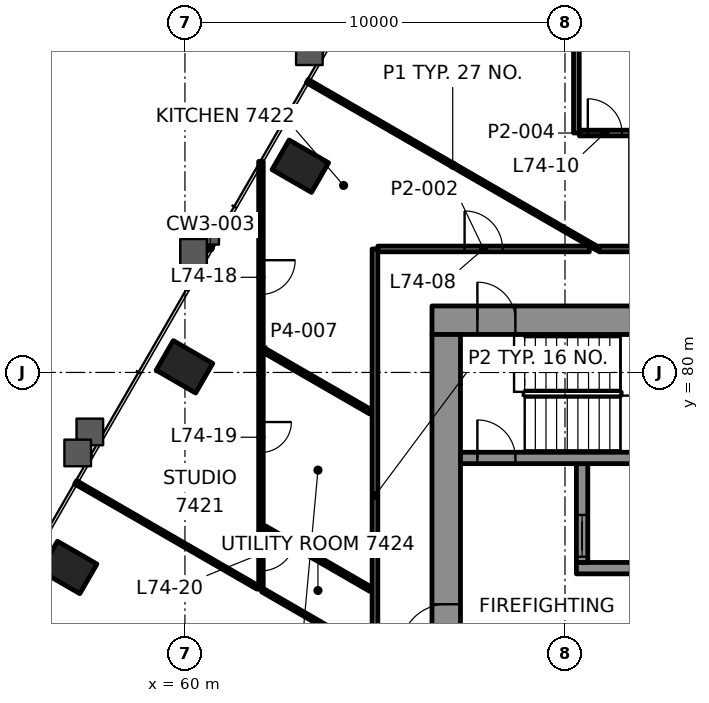
"""IFC4 building model, lengths in metres.
Left out: names, types, materials, properties, quantities, classifications, styles, units other than length and angle.
Written with IfcOpenShell. Run it as: python <this file> out.ifc"""

import sys

from ifc_helpers import new_model, si_unit, direction, frame, frame_2d, origin, origin_2d, place, context, subcontext, project, spatial, rectangle, hollow_rectangle, extrude, element, fill, save


model = new_model("IFC4")
c1 = context("Model", 3, precision=1e-05, world=origin(), true_north=direction((0.0, 1.0)))
c2 = subcontext(c1, "Body", "Model", "MODEL_VIEW")
j1 = project(units=[si_unit("LENGTHUNIT", "METRE"), si_unit("PLANEANGLEUNIT", "RADIAN")], contexts=[c1])
p1 = place(None, origin())
s1 = spatial("IfcSite", under=j1, at=p1, CompositionType="ELEMENT")
p2 = place(p1, origin())
s2 = spatial("IfcBuilding", under=s1, at=p2, CompositionType="ELEMENT")
p3 = place(p2, frame((0.0, 0.0, 305.6)))
s3 = spatial("IfcBuildingStorey", under=s2, at=p3, CompositionType="ELEMENT", Elevation=305.6)
for number, where, z_axis, x_axis in (
    (1, (63.035, 85.427, -0.0), (0.0, 0.0, 1.0), (-0.5, -0.866, 0.0)),
    (2, (59.987, 80.148, -0.0), (0.0, 0.0, 1.0), (-0.5, -0.866, 0.0)),
    (3, (56.939, 74.869, -0.0), (0.0, 0.0, 1.0), (-0.5, -0.866, 0.0)),
):
    element("IfcColumn", number, at=place(p3, frame(where, z_axis=z_axis, x_axis=x_axis)), inside=s3, PredefinedType="COLUMN", context=c2, shape_type="SweptSolid", body=[
        extrude(hollow_rectangle(XDim=0.9, YDim=1.2, WallThickness=0.06, at=origin_2d()), origin(), (0.0, 0.0, 1.0), 3.5),
    ])
p4 = place(p3, frame((66.5, 81.375, 0.0), z_axis=(0.0, 0.0, 1.0), x_axis=(1.0, 0.0, 0.0)))
e4 = element("IfcWall", 4, at=p4, inside=s3, PredefinedType="SHEAR", context=c2, shape_type="SweptSolid", body=[
    extrude(rectangle(XDim=17.0, YDim=0.75, at=frame_2d((8.5, 0.0))), origin(), (0.0, 0.0, 1.0), 3.3),
])
p5 = place(p4, frame((1.195, 0.0, 0.0)))
e5 = element("IfcOpeningElement", 5, at=p5, cuts=e4, PredefinedType="OPENING", context=c2, shape_type="SweptSolid", body=[
    extrude(rectangle(XDim=1.0, YDim=2.1, at=frame_2d((0.5, 1.05))), frame((0.0, 0.385, 0.0), z_axis=(0.0, -1.0, 0.0), x_axis=(1.0, 0.0, 0.0)), (0.0, 0.0, 1.0), 0.77),
])
p6 = place(p4, frame((15.005, 0.0, 0.0)))
e6 = element("IfcOpeningElement", 6, at=p6, cuts=e4, PredefinedType="OPENING", context=c2, shape_type="SweptSolid", body=[
    extrude(rectangle(XDim=1.0, YDim=2.1, at=frame_2d((0.5, 1.05))), frame((0.0, 0.385, 0.0), z_axis=(0.0, -1.0, 0.0), x_axis=(1.0, 0.0, 0.0)), (0.0, 0.0, 1.0), 0.77),
])
p7 = place(p4, frame((8.15, 0.0, 0.0)))
e7 = element("IfcOpeningElement", 7, at=p7, cuts=e4, PredefinedType="OPENING", context=c2, shape_type="SweptSolid", body=[
    extrude(rectangle(XDim=0.9, YDim=2.1, at=frame_2d((0.45, 1.05))), frame((0.0, 0.385, 0.0), z_axis=(0.0, -1.0, 0.0), x_axis=(1.0, 0.0, 0.0)), (0.0, 0.0, 1.0), 0.77),
])
p8 = place(p3, frame((66.875, 69.0, 0.0), z_axis=(0.0, 0.0, 1.0), x_axis=(0.0, 1.0, 0.0)))
e8 = element("IfcWall", 8, at=p8, inside=s3, PredefinedType="SHEAR", context=c2, shape_type="SweptSolid", body=[
    extrude(rectangle(XDim=12.0, YDim=0.75, at=frame_2d((6.0, 0.0))), origin(), (0.0, 0.0, 1.0), 3.3),
])
p9 = place(p8, frame((3.7, 0.0, 0.0)))
e9 = element("IfcOpeningElement", 9, at=p9, cuts=e8, PredefinedType="OPENING", context=c2, shape_type="SweptSolid", body=[
    extrude(rectangle(XDim=1.2, YDim=2.1, at=frame_2d((0.6, 1.05))), frame((0.0, 0.385, 0.0), z_axis=(0.0, -1.0, 0.0), x_axis=(1.0, 0.0, 0.0)), (0.0, 0.0, 1.0), 0.77),
])
p10 = place(p8, frame((0.925, 0.0, 0.0)))
e10 = element("IfcOpeningElement", 10, at=p10, cuts=e8, PredefinedType="OPENING", context=c2, shape_type="SweptSolid", body=[
    extrude(rectangle(XDim=0.9, YDim=2.1, at=frame_2d((0.45, 1.05))), frame((0.0, 0.385, 0.0), z_axis=(0.0, -1.0, 0.0), x_axis=(1.0, 0.0, 0.0)), (0.0, 0.0, 1.0), 0.77),
])
p11 = place(p3, frame((70.3, 74.85, 0.0), z_axis=(0.0, 0.0, 1.0), x_axis=(1.0, 0.0, 0.0)))
e11 = element("IfcWall", 11, at=p11, inside=s3, PredefinedType="SHEAR", context=c2, shape_type="SweptSolid", body=[
    extrude(rectangle(XDim=5.9, YDim=0.3, at=frame_2d((2.95, 0.0))), origin(), (0.0, 0.0, 1.0), 3.3),
])
p12 = place(p11, frame((3.8, 0.0, 0.0)))
e12 = element("IfcOpeningElement", 12, at=p12, cuts=e11, PredefinedType="OPENING", context=c2, shape_type="SweptSolid", body=[
    extrude(rectangle(XDim=1.1, YDim=2.1, at=frame_2d((0.55, 1.05))), frame((0.0, 0.16, 0.0), z_axis=(0.0, -1.0, 0.0), x_axis=(1.0, 0.0, 0.0)), (0.0, 0.0, 1.0), 0.32),
])
p13 = place(p3, frame((70.45, 75.0, 0.0), z_axis=(0.0, 0.0, 1.0), x_axis=(0.0, 1.0, 0.0)))
e13 = element("IfcWall", 13, at=p13, inside=s3, PredefinedType="SHEAR", context=c2, shape_type="SweptSolid", body=[
    extrude(rectangle(XDim=2.6, YDim=0.3, at=frame_2d((1.3, 0.0))), origin(), (0.0, 0.0, 1.0), 3.3),
])
p14 = place(p13, frame((0.15, 0.0, 0.0)))
e14 = element("IfcOpeningElement", 14, at=p14, cuts=e13, PredefinedType="OPENING", context=c2, shape_type="SweptSolid", body=[
    extrude(rectangle(XDim=1.1, YDim=2.1, at=frame_2d((0.55, 1.05))), frame((0.0, 0.16, 0.0), z_axis=(0.0, -1.0, 0.0), x_axis=(1.0, 0.0, 0.0)), (0.0, 0.0, 1.0), 0.32),
])
p15 = place(p3, frame((67.25, 77.75, 0.0), z_axis=(0.0, 0.0, 1.0), x_axis=(1.0, 0.0, 0.0)))
e15 = element("IfcWall", 15, at=p15, inside=s3, PredefinedType="SHEAR", context=c2, shape_type="SweptSolid", body=[
    extrude(rectangle(XDim=15.5, YDim=0.3, at=frame_2d((7.75, 0.0))), origin(), (0.0, 0.0, 1.0), 3.3),
])
p16 = place(p15, frame((0.445, 0.0, 0.0)))
e16 = element("IfcOpeningElement", 16, at=p16, cuts=e15, PredefinedType="OPENING", context=c2, shape_type="SweptSolid", body=[
    extrude(rectangle(XDim=1.0, YDim=2.1, at=frame_2d((0.5, 1.05))), frame((0.0, 0.16, 0.0), z_axis=(0.0, -1.0, 0.0), x_axis=(1.0, 0.0, 0.0)), (0.0, 0.0, 1.0), 0.32),
])
p17 = place(p3, frame((65.075, 83.25, 0.0), z_axis=(0.0, 0.0, 1.0), x_axis=(1.0, 0.0, 0.0)))
e17 = element("IfcWall", 17, at=p17, inside=s3, PredefinedType="PARTITIONING", context=c2, shape_type="SweptSolid", body=[
    extrude(rectangle(XDim=5.565, YDim=0.15, at=frame_2d((2.783, 0.0))), origin(), (0.0, 0.0, 1.0), 2.7),
])
p18 = place(p17, frame((2.283, 0.0, 0.0)))
e18 = element("IfcOpeningElement", 18, at=p18, cuts=e17, PredefinedType="OPENING", context=c2, shape_type="SweptSolid", body=[
    extrude(rectangle(XDim=1.0, YDim=2.1, at=frame_2d((0.5, 1.05))), frame((0.0, 0.085, 0.0), z_axis=(0.0, -1.0, 0.0), x_axis=(1.0, 0.0, 0.0)), (0.0, 0.0, 1.0), 0.17),
])
p19 = place(p3, frame((70.377, 86.3, 0.0), z_axis=(0.0, 0.0, 1.0), x_axis=(1.0, 0.0, 0.0)))
e19 = element("IfcWall", 19, at=p19, inside=s3, PredefinedType="PARTITIONING", context=c2, shape_type="SweptSolid", body=[
    extrude(rectangle(XDim=1.348, YDim=0.15, at=frame_2d((0.674, 0.0))), origin(), (0.0, 0.0, 1.0), 2.7),
])
p20 = place(p19, frame((0.224, 0.0, 0.0)))
e20 = element("IfcOpeningElement", 20, at=p20, cuts=e19, PredefinedType="OPENING", context=c2, shape_type="SweptSolid", body=[
    extrude(rectangle(XDim=0.9, YDim=2.1, at=frame_2d((0.45, 1.05))), frame((0.0, 0.085, 0.0), z_axis=(0.0, -1.0, 0.0), x_axis=(1.0, 0.0, 0.0)), (0.0, 0.0, 1.0), 0.17),
])
p21 = place(p3, frame((70.3, 86.302, 0.0), z_axis=(0.0, 0.0, 1.0), x_axis=(0.0, 1.0, 0.0)))
e21 = element("IfcWall", 21, at=p21, inside=s3, PredefinedType="PARTITIONING", context=c2, shape_type="SweptSolid", body=[
    extrude(rectangle(XDim=9.796, YDim=0.15, at=frame_2d((4.898, 0.0))), origin(), (0.0, 0.0, 1.0), 2.7),
])
p22 = place(p3, frame((65.0, 70.266, 0.0), z_axis=(0.0, 0.0, 1.0), x_axis=(0.0, 1.0, 0.0)))
e22 = element("IfcWall", 22, at=p22, inside=s3, PredefinedType="PARTITIONING", context=c2, shape_type="SweptSolid", body=[
    extrude(rectangle(XDim=12.984, YDim=0.15, at=frame_2d((6.492, 0.0))), origin(), (0.0, 0.0, 1.0), 2.7),
])
p23 = place(p3, frame((62.0, 85.554, 0.0), z_axis=(0.0, 0.0, 1.0), x_axis=(0.0, -1.0, 0.0)))
e23 = element("IfcWall", 23, at=p23, inside=s3, PredefinedType="PARTITIONING", context=c2, shape_type="SweptSolid", body=[
    extrude(rectangle(XDim=11.261, YDim=0.12, at=frame_2d((5.63, 0.0))), origin(), (0.0, 0.0, 1.0), 2.688),
])
p24 = place(p23, frame((2.6, 0.0, 0.0)))
e24 = element("IfcOpeningElement", 24, at=p24, cuts=e23, PredefinedType="OPENING", context=c2, shape_type="SweptSolid", body=[
    extrude(rectangle(XDim=0.9, YDim=2.1, at=frame_2d((0.45, 1.05))), frame((0.0, 0.07, 0.0), z_axis=(0.0, -1.0, 0.0), x_axis=(1.0, 0.0, 0.0)), (0.0, 0.0, 1.0), 0.14),
])
p25 = place(p23, frame((6.859, 0.0, 0.0)))
e25 = element("IfcOpeningElement", 25, at=p25, cuts=e23, PredefinedType="OPENING", context=c2, shape_type="SweptSolid", body=[
    extrude(rectangle(XDim=0.8, YDim=2.1, at=frame_2d((0.4, 1.05))), frame((0.0, 0.07, 0.0), z_axis=(0.0, -1.0, 0.0), x_axis=(1.0, 0.0, 0.0)), (0.0, 0.0, 1.0), 0.14),
])
p26 = place(p23, frame((9.876, 0.0, 0.0)))
e26 = element("IfcOpeningElement", 26, at=p26, cuts=e23, PredefinedType="OPENING", context=c2, shape_type="SweptSolid", body=[
    extrude(rectangle(XDim=0.9, YDim=2.1, at=frame_2d((0.45, 1.05))), frame((0.0, 0.07, 0.0), z_axis=(0.0, -1.0, 0.0), x_axis=(1.0, 0.0, 0.0)), (0.0, 0.0, 1.0), 0.14),
])
p27 = place(p3, frame((70.871, 83.25, 0.0), z_axis=(0.0, 0.0, 1.0), x_axis=(-0.866018527528, 0.500011909837, 0.0)))
e27 = element("IfcWall", 27, at=p27, inside=s3, PredefinedType="PARTITIONING", context=c2, shape_type="SweptSolid", body=[
    extrude(rectangle(XDim=8.834, YDim=0.1, at=frame_2d((4.417, 0.0))), origin(), (0.0, 0.0, 1.0), 2.688),
])
for number, where, z_axis, x_axis in (
    (28, (64.89, 78.959, 0.0), (0.0, 0.0, 1.0), (-0.866, 0.5, 0.0)),
    (29, (64.89, 74.293, 0.0), (0.0, 0.0, 1.0), (-0.866, 0.5, 0.0)),
):
    element("IfcWall", number, at=place(p3, frame(where, z_axis=z_axis, x_axis=x_axis)), inside=s3, PredefinedType="PARTITIONING", context=c2, shape_type="SweptSolid", body=[
        extrude(rectangle(XDim=3.228, YDim=0.12, at=frame_2d((1.614, 0.0))), origin(), (0.0, 0.0, 1.0), 2.7),
    ])
p28 = place(p3, frame((64.899, 72.62, 0.0), z_axis=(0.0, 0.0, 1.0), x_axis=(-0.866032610133, 0.499987518031, 0.0)))
e30 = element("IfcWall", 30, at=p28, inside=s3, PredefinedType="PARTITIONING", context=c2, shape_type="SweptSolid", body=[
    extrude(rectangle(XDim=3.295, YDim=0.1, at=frame_2d((1.648, 0.0))), origin(), (0.0, 0.0, 1.0), 2.7),
])
p29 = place(p3, frame((70.896, 83.25, 0.0), z_axis=(0.0, 0.0, 1.0), x_axis=(1.0, 0.0, 0.0)))
e31 = element("IfcWall", 31, at=p29, inside=s3, PredefinedType="PARTITIONING", context=c2, shape_type="SweptSolid", body=[
    extrude(rectangle(XDim=0.905, YDim=0.15, at=frame_2d((0.452, 0.0))), origin(), (0.0, 0.0, 1.0), 2.7),
])
p30 = place(p3, frame((61.915, 74.343, 0.0), z_axis=(0.0, 0.0, 1.0), x_axis=(-0.866023907196, 0.500002592159, 0.0)))
e32 = element("IfcWall", 32, at=p30, inside=s3, PredefinedType="PARTITIONING", context=c2, shape_type="SweptSolid", body=[
    extrude(rectangle(XDim=5.532, YDim=0.1, at=frame_2d((2.766, 0.0))), origin(), (0.0, 0.0, 1.0), 2.688),
])
p31 = place(p18, origin())
e33 = element("IfcDoor", 33, at=p31, inside=s3, OperationType="SINGLE_SWING_RIGHT", PredefinedType="DOOR", context=c2, shape_type="SweptSolid", body=[
    extrude(rectangle(XDim=1.0, YDim=2.1, at=frame_2d((0.5, 1.05))), frame((0.0, 0.025, 0.0), z_axis=(0.0, -1.0, 0.0), x_axis=(1.0, 0.0, 0.0)), (0.0, 0.0, 1.0), 0.05),
])
fill(e18, e33)
p32 = place(p20, origin())
e34 = element("IfcDoor", 34, at=p32, inside=s3, OperationType="SINGLE_SWING_LEFT", PredefinedType="DOOR", context=c2, shape_type="SweptSolid", body=[
    extrude(rectangle(XDim=0.9, YDim=2.1, at=frame_2d((0.45, 1.05))), frame((0.0, 0.025, 0.0), z_axis=(0.0, -1.0, 0.0), x_axis=(1.0, 0.0, 0.0)), (0.0, 0.0, 1.0), 0.05),
])
fill(e20, e34)
p33 = place(p24, origin())
e35 = element("IfcDoor", 35, at=p33, inside=s3, OperationType="SINGLE_SWING_RIGHT", PredefinedType="DOOR", context=c2, shape_type="SweptSolid", body=[
    extrude(rectangle(XDim=0.9, YDim=2.1, at=frame_2d((0.45, 1.05))), frame((0.0, 0.025, 0.0), z_axis=(0.0, -1.0, 0.0), x_axis=(1.0, 0.0, 0.0)), (0.0, 0.0, 1.0), 0.05),
])
fill(e24, e35)
p34 = place(p25, origin())
e36 = element("IfcDoor", 36, at=p34, inside=s3, OperationType="SINGLE_SWING_RIGHT", PredefinedType="DOOR", context=c2, shape_type="SweptSolid", body=[
    extrude(rectangle(XDim=0.8, YDim=2.1, at=frame_2d((0.4, 1.05))), frame((0.0, 0.025, 0.0), z_axis=(0.0, -1.0, 0.0), x_axis=(1.0, 0.0, 0.0)), (0.0, 0.0, 1.0), 0.05),
])
fill(e25, e36)
p35 = place(p26, origin())
e37 = element("IfcDoor", 37, at=p35, inside=s3, OperationType="SINGLE_SWING_LEFT", PredefinedType="DOOR", context=c2, shape_type="SweptSolid", body=[
    extrude(rectangle(XDim=0.9, YDim=2.1, at=frame_2d((0.45, 1.05))), frame((0.0, 0.025, 0.0), z_axis=(0.0, -1.0, 0.0), x_axis=(1.0, 0.0, 0.0)), (0.0, 0.0, 1.0), 0.05),
])
fill(e26, e37)
p36 = place(p14, origin())
e38 = element("IfcDoor", 38, at=p36, inside=s3, OperationType="DOUBLE_DOOR_SLIDING", PredefinedType="DOOR", context=c2, shape_type="SweptSolid", body=[
    extrude(rectangle(XDim=1.1, YDim=2.1, at=frame_2d((0.55, 1.05))), frame((0.0, 0.025, 0.0), z_axis=(0.0, -1.0, 0.0), x_axis=(1.0, 0.0, 0.0)), (0.0, 0.0, 1.0), 0.05),
])
fill(e14, e38)
p37 = place(p16, origin())
e39 = element("IfcDoor", 39, at=p37, inside=s3, OperationType="SINGLE_SWING_LEFT", PredefinedType="DOOR", context=c2, shape_type="SweptSolid", body=[
    extrude(rectangle(XDim=1.0, YDim=2.1, at=frame_2d((0.5, 1.05))), frame((0.0, 0.025, 0.0), z_axis=(0.0, -1.0, 0.0), x_axis=(1.0, 0.0, 0.0)), (0.0, 0.0, 1.0), 0.05),
])
fill(e16, e39)
p38 = place(p5, origin())
e40 = element("IfcDoor", 40, at=p38, inside=s3, OperationType="SINGLE_SWING_RIGHT", PredefinedType="DOOR", context=c2, shape_type="SweptSolid", body=[
    extrude(rectangle(XDim=1.0, YDim=2.1, at=frame_2d((0.5, 1.05))), frame((0.0, 0.095, 0.0), z_axis=(0.0, -1.0, 0.0), x_axis=(1.0, 0.0, 0.0)), (0.0, 0.0, 1.0), 0.19),
])
fill(e5, e40)
p39 = place(p9, origin())
e41 = element("IfcDoor", 41, at=p39, inside=s3, OperationType="SINGLE_SWING_RIGHT", PredefinedType="DOOR", context=c2, shape_type="SweptSolid", body=[
    extrude(rectangle(XDim=1.2, YDim=2.1, at=frame_2d((0.6, 1.05))), frame((0.0, 0.095, 0.0), z_axis=(0.0, -1.0, 0.0), x_axis=(1.0, 0.0, 0.0)), (0.0, 0.0, 1.0), 0.19),
])
fill(e9, e41)
save(model, sys.argv[1])
